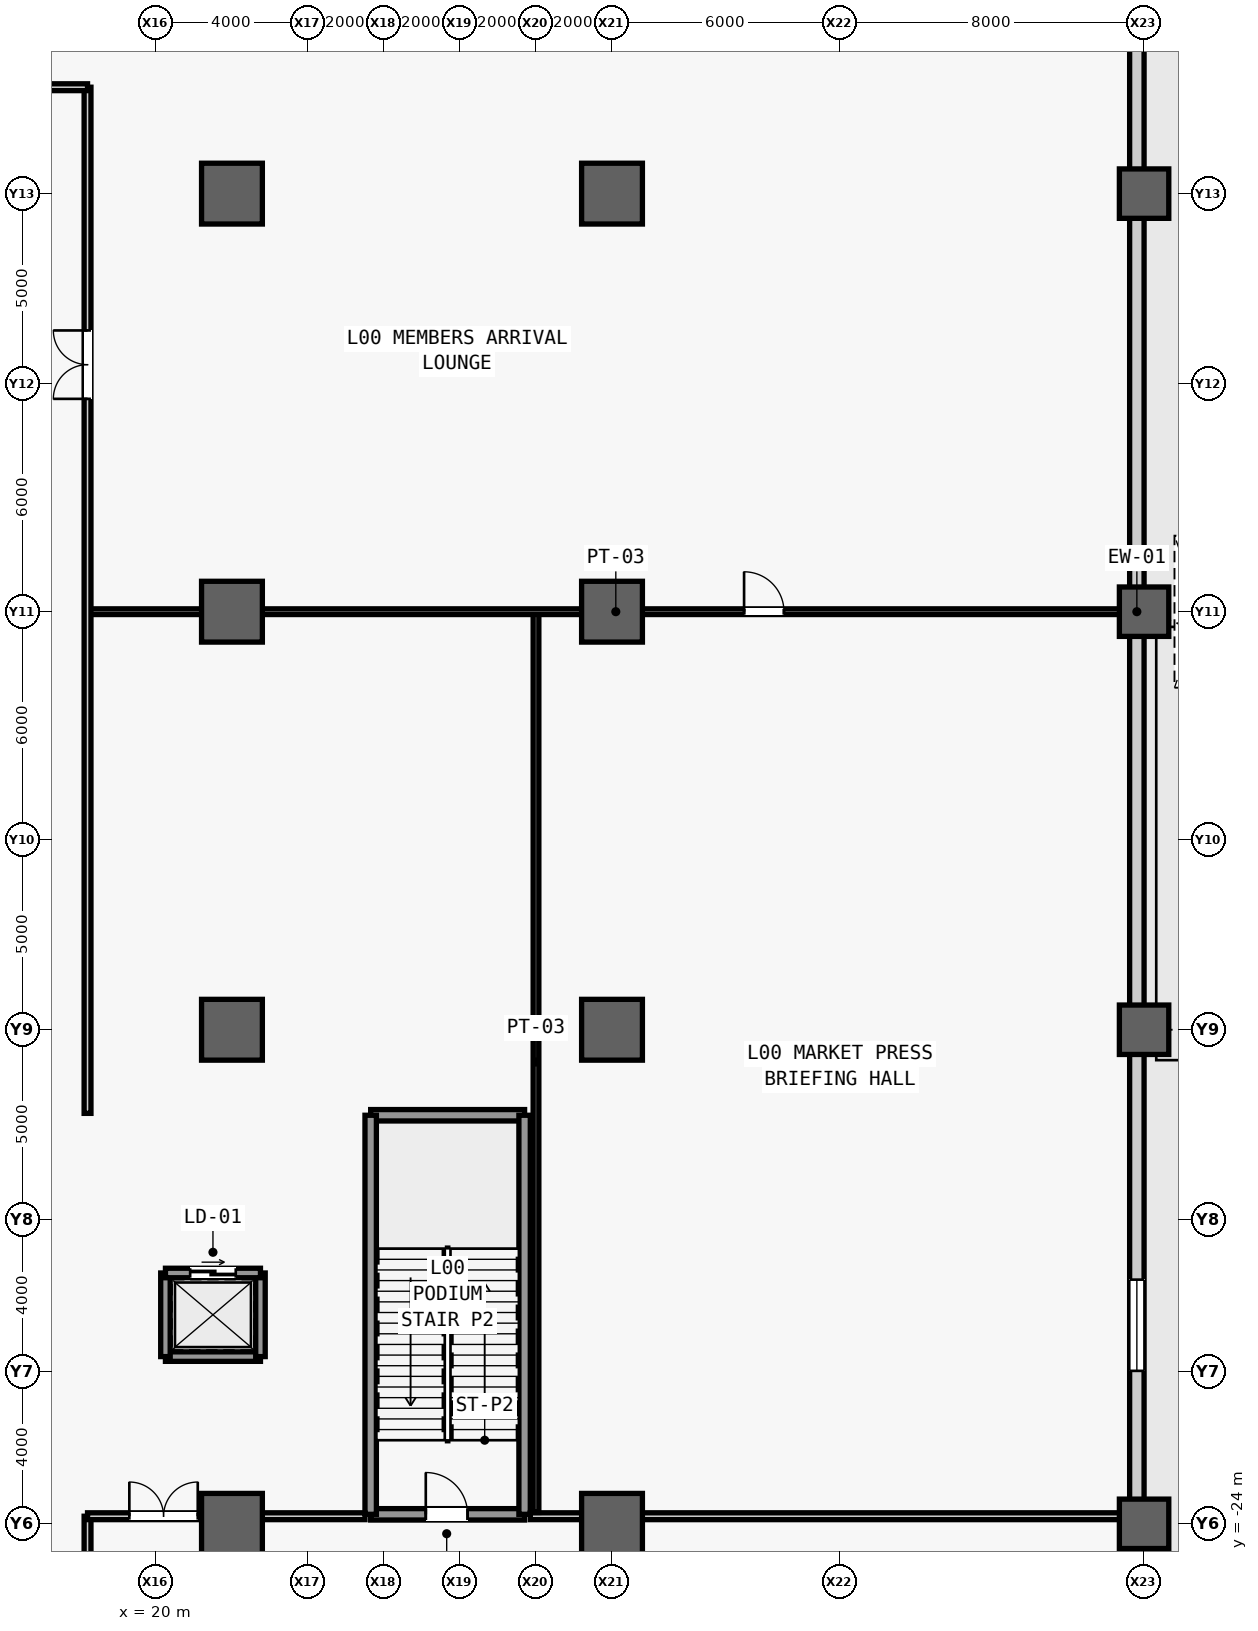
"""IFC4 building model, lengths in metres.
Left out: names, types, materials, properties, quantities, classifications, styles, units other than length and angle.
Written with IfcOpenShell. Run it as: python <this file> out.ifc"""

import sys

from ifc_helpers import new_model, si_unit, direction, frame, frame_2d, origin, origin_2d, place, context, subcontext, project, spatial, rectangle, extrude, source, transform, mapped, element, fill, save


model = new_model("IFC4")
c1 = context("Model", 3, precision=1e-05, world=origin(), true_north=direction((0.0, 1.0)))
c2 = subcontext(c1, "Body", "Model", "MODEL_VIEW")
j1 = project(units=[si_unit("LENGTHUNIT", "METRE"), si_unit("PLANEANGLEUNIT", "RADIAN")], contexts=[c1])
p1 = place(None, origin())
s1 = spatial("IfcSite", under=j1, at=p1, CompositionType="ELEMENT")
p2 = place(p1, origin())
s2 = spatial("IfcBuilding", under=s1, at=p2, CompositionType="ELEMENT")
p3 = place(p2, origin())
s3 = spatial("IfcBuildingStorey", under=s2, at=p3, CompositionType="ELEMENT", Elevation=0.0)
m1 = source(origin(), c2, "Body", "SweptSolid", [
    extrude(rectangle(XDim=1.6, YDim=1.6, at=origin_2d()), origin(), (0.0, 0.0, 1.0), 6.6),
])
for number, where, z_axis, x_axis in (
    (1, (22.0, -24.0, 0.0), (0.0, 0.0, 1.0), (1.0, 0.0, 0.0)),
    (2, (22.0, -11.0, 0.0), (0.0, 0.0, 1.0), (1.0, 0.0, 0.0)),
    (3, (22.0, 0.0, 0.0), (0.0, 0.0, 1.0), (1.0, 0.0, 0.0)),
    (4, (22.0, 11.0, 0.0), (0.0, 0.0, 1.0), (1.0, 0.0, 0.0)),
    (5, (32.0, -24.0, 0.0), (0.0, 0.0, 1.0), (1.0, 0.0, 0.0)),
    (6, (32.0, -11.0, 0.0), (0.0, 0.0, 1.0), (1.0, 0.0, 0.0)),
    (7, (32.0, 0.0, 0.0), (0.0, 0.0, 1.0), (1.0, 0.0, 0.0)),
    (8, (32.0, 11.0, 0.0), (0.0, 0.0, 1.0), (1.0, 0.0, 0.0)),
):
    element("IfcColumn", number, at=place(p3, frame(where, z_axis=z_axis, x_axis=x_axis)), inside=s3, PredefinedType="COLUMN", context=c2, shape_type="MappedRepresentation", body=[
        mapped(m1, transform((0.0, 0.0, 0.0), scale=1.0)),
    ])
m2 = source(origin(), c2, "Body", "SweptSolid", [
    extrude(rectangle(XDim=1.3, YDim=1.3, at=origin_2d()), origin(), (0.0, 0.0, 1.0), 6.6),
])
for number, where, z_axis, x_axis in (
    (9, (46.0, -24.0, 0.0), (0.0, 0.0, 1.0), (1.0, 0.0, 0.0)),
    (10, (46.0, -11.0, 0.0), (0.0, 0.0, 1.0), (1.0, 0.0, 0.0)),
    (11, (46.0, 0.0, 0.0), (0.0, 0.0, 1.0), (1.0, 0.0, 0.0)),
    (12, (46.0, 11.0, 0.0), (0.0, 0.0, 1.0), (1.0, 0.0, 0.0)),
):
    element("IfcColumn", number, at=place(p3, frame(where, z_axis=z_axis, x_axis=x_axis)), inside=s3, PredefinedType="COLUMN", context=c2, shape_type="MappedRepresentation", body=[
        mapped(m2, transform((0.0, 0.0, 0.0), scale=1.0)),
    ])
m3 = source(origin(), c2, "Body", "SweptSolid", [
    extrude(rectangle(XDim=75.1, YDim=0.38, at=frame_2d((37.55, 0.0))), origin(), (0.0, 0.0, 1.0), 4.48),
])
p4 = place(p3, frame((45.81, 37.55, 0.0), z_axis=(0.0, 0.0, 1.0), x_axis=(0.0, -1.0, 0.0)))
e13 = element("IfcWall", 13, at=p4, inside=s3, PredefinedType="STANDARD", context=c2, shape_type="MappedRepresentation", body=[
    mapped(m3, transform((0.0, 0.0, 0.0), scale=1.0)),
])
m4 = source(origin(), c2, "Body", "SweptSolid", [
    extrude(rectangle(XDim=2.0, YDim=2.3, at=frame_2d((1.0, 1.15))), frame((0.0, 0.2, 0.0), z_axis=(0.0, -1.0, 0.0), x_axis=(1.0, 0.0, 0.0)), (0.0, 0.0, 1.0), 0.4),
])
p5 = place(p4, frame((63.55, 0.0, 0.0)))
e14 = element("IfcOpeningElement", 14, at=p5, cuts=e13, PredefinedType="OPENING", context=c2, shape_type="MappedRepresentation", body=[
    mapped(m4, transform((0.0, 0.0, 0.0), scale=1.0)),
])
m5 = source(origin(), c2, "Body", "SweptSolid", [
    extrude(rectangle(XDim=6.2, YDim=3.6, at=frame_2d((3.1, 1.8))), frame((0.0, 0.2, 0.0), z_axis=(0.0, -1.0, 0.0), x_axis=(1.0, 0.0, 0.0)), (0.0, 0.0, 1.0), 0.4),
])
p6 = place(p4, frame((0.75, 0.0, 0.0)))
e15 = element("IfcOpeningElement", 15, at=p6, cuts=e13, PredefinedType="OPENING", context=c2, shape_type="MappedRepresentation", body=[
    mapped(m5, transform((0.0, 0.0, 0.0), scale=1.0)),
])
m6 = source(origin(), c2, "Body", "SweptSolid", [
    extrude(rectangle(XDim=2.4, YDim=2.6, at=frame_2d((1.2, 1.3))), frame((0.0, 0.2, 0.0), z_axis=(0.0, -1.0, 0.0), x_axis=(1.0, 0.0, 0.0)), (0.0, 0.0, 1.0), 0.4),
])
p7 = place(p4, frame((17.575, 0.0, 0.7)))
e16 = element("IfcOpeningElement", 16, at=p7, cuts=e13, PredefinedType="OPENING", context=c2, shape_type="MappedRepresentation", body=[
    mapped(m6, transform((0.0, 0.0, 0.0), scale=1.0)),
])
p8 = place(p4, frame((55.125, 0.0, 0.7)))
e17 = element("IfcOpeningElement", 17, at=p8, cuts=e13, PredefinedType="OPENING", context=c2, shape_type="MappedRepresentation", body=[
    mapped(m6, transform((0.0, 0.0, 0.0), scale=1.0)),
])
m7 = source(origin(), c2, "Body", "SweptSolid", [
    extrude(rectangle(XDim=4.05, YDim=0.3, at=frame_2d((2.025, 0.0))), origin(), (0.0, 0.0, 1.0), 6.28),
])
p9 = place(p3, frame((25.65, -23.75, 0.0), z_axis=(0.0, 0.0, 1.0), x_axis=(1.0, 0.0, 0.0)))
e18 = element("IfcWall", 18, at=p9, inside=s3, PredefinedType="SHEAR", context=c2, shape_type="MappedRepresentation", body=[
    mapped(m7, transform((0.0, 0.0, 0.0), scale=1.0)),
])
m8 = source(origin(), c2, "Body", "SweptSolid", [
    extrude(rectangle(XDim=1.1, YDim=2.2, at=frame_2d((0.55, 1.1))), frame((0.0, 0.16, 0.0), z_axis=(0.0, -1.0, 0.0), x_axis=(1.0, 0.0, 0.0)), (0.0, 0.0, 1.0), 0.32),
])
p10 = place(p9, frame((1.45, 0.0, 0.0)))
e19 = element("IfcOpeningElement", 19, at=p10, cuts=e18, PredefinedType="OPENING", context=c2, shape_type="MappedRepresentation", body=[
    mapped(m8, transform((0.0, 0.0, 0.0), scale=1.0)),
])
p11 = place(p3, frame((25.65, -13.25, 0.0), z_axis=(0.0, 0.0, 1.0), x_axis=(1.0, 0.0, 0.0)))
e20 = element("IfcWall", 20, at=p11, inside=s3, PredefinedType="SHEAR", context=c2, shape_type="MappedRepresentation", body=[
    mapped(m7, transform((0.0, 0.0, 0.0), scale=1.0)),
])
m9 = source(origin(), c2, "Body", "SweptSolid", [
    extrude(rectangle(XDim=10.5, YDim=0.3, at=frame_2d((5.25, 0.0))), origin(), (0.0, 0.0, 1.0), 6.28),
])
for number, where, z_axis, x_axis in (
    (21, (25.65, -23.75, 0.0), (0.0, 0.0, 1.0), (0.0, 1.0, 0.0)),
    (22, (29.7, -23.75, 0.0), (0.0, 0.0, 1.0), (0.0, 1.0, 0.0)),
):
    element("IfcWall", number, at=place(p3, frame(where, z_axis=z_axis, x_axis=x_axis)), inside=s3, PredefinedType="SHEAR", context=c2, shape_type="MappedRepresentation", body=[
        mapped(m9, transform((0.0, 0.0, 0.0), scale=1.0)),
    ])
m10 = source(origin(), c2, "Body", "SweptSolid", [
    extrude(rectangle(XDim=2.5, YDim=0.25, at=frame_2d((1.25, 0.0))), origin(), (0.0, 0.0, 1.0), 6.28),
])
p12 = place(p3, frame((20.25, -19.6, 0.0), z_axis=(0.0, 0.0, 1.0), x_axis=(1.0, 0.0, 0.0)))
e23 = element("IfcWall", 23, at=p12, inside=s3, PredefinedType="SHEAR", context=c2, shape_type="MappedRepresentation", body=[
    mapped(m10, transform((0.0, 0.0, 0.0), scale=1.0)),
])
m11 = source(origin(), c2, "Body", "SweptSolid", [
    extrude(rectangle(XDim=2.2, YDim=0.25, at=frame_2d((1.1, 0.0))), origin(), (0.0, 0.0, 1.0), 6.28),
])
for number, where, z_axis, x_axis in (
    (24, (20.25, -19.6, 0.0), (0.0, 0.0, 1.0), (0.0, 1.0, 0.0)),
    (25, (22.75, -19.6, 0.0), (0.0, 0.0, 1.0), (0.0, 1.0, 0.0)),
):
    element("IfcWall", number, at=place(p3, frame(where, z_axis=z_axis, x_axis=x_axis)), inside=s3, PredefinedType="SHEAR", context=c2, shape_type="MappedRepresentation", body=[
        mapped(m11, transform((0.0, 0.0, 0.0), scale=1.0)),
    ])
p13 = place(p3, frame((20.25, -17.4, 0.0), z_axis=(0.0, 0.0, 1.0), x_axis=(1.0, 0.0, 0.0)))
e26 = element("IfcWall", 26, at=p13, inside=s3, PredefinedType="SHEAR", context=c2, shape_type="MappedRepresentation", body=[
    mapped(m10, transform((0.0, 0.0, 0.0), scale=1.0)),
])
m12 = source(origin(), c2, "Body", "SweptSolid", [
    extrude(rectangle(XDim=1.2, YDim=2.3, at=frame_2d((0.6, 1.15))), frame((0.0, 0.135, 0.0), z_axis=(0.0, -1.0, 0.0), x_axis=(1.0, 0.0, 0.0)), (0.0, 0.0, 1.0), 0.27),
])
p14 = place(p13, frame((0.65, 0.0, 0.0)))
e27 = element("IfcOpeningElement", 27, at=p14, cuts=e26, PredefinedType="OPENING", context=c2, shape_type="MappedRepresentation", body=[
    mapped(m12, transform((0.0, 0.0, 0.0), scale=1.0)),
])
m13 = source(origin(), c2, "Body", "SweptSolid", [
    extrude(rectangle(XDim=4.5, YDim=0.18, at=frame_2d((2.25, 0.0))), origin(), (0.0, 0.0, 1.0), 6.28),
])
p15 = place(p3, frame((18.2, -28.3, 0.0), z_axis=(0.0, 0.0, 1.0), x_axis=(0.0, 1.0, 0.0)))
e28 = element("IfcWall", 28, at=p15, inside=s3, PredefinedType="PARTITIONING", context=c2, shape_type="MappedRepresentation", body=[
    mapped(m13, transform((0.0, 0.0, 0.0), scale=1.0)),
])
m14 = source(origin(), c2, "Body", "SweptSolid", [
    extrude(rectangle(XDim=1.8, YDim=2.25, at=frame_2d((0.9, 1.125))), frame((0.0, 0.1, 0.0), z_axis=(0.0, -1.0, 0.0), x_axis=(1.0, 0.0, 0.0)), (0.0, 0.0, 1.0), 0.2),
])
p16 = place(p15, frame((1.4, 0.0, 0.0)))
e29 = element("IfcOpeningElement", 29, at=p16, cuts=e28, PredefinedType="OPENING", context=c2, shape_type="MappedRepresentation", body=[
    mapped(m14, transform((0.0, 0.0, 0.0), scale=1.0)),
])
m15 = source(origin(), c2, "Body", "SweptSolid", [
    extrude(rectangle(XDim=7.3, YDim=0.18, at=frame_2d((3.65, 0.0))), origin(), (0.0, 0.0, 1.0), 4.08),
])
p17 = place(p3, frame((18.2, -23.8, 0.0), z_axis=(0.0, 0.0, 1.0), x_axis=(1.0, 0.0, 0.0)))
e30 = element("IfcWall", 30, at=p17, inside=s3, PredefinedType="PARTITIONING", context=c2, shape_type="MappedRepresentation", body=[
    mapped(m15, transform((0.0, 0.0, 0.0), scale=1.0)),
])
p18 = place(p17, frame((1.1, 0.0, 0.0)))
e31 = element("IfcOpeningElement", 31, at=p18, cuts=e30, PredefinedType="OPENING", context=c2, shape_type="MappedRepresentation", body=[
    mapped(m14, transform((0.0, 0.0, 0.0), scale=1.0)),
])
m16 = source(origin(), c2, "Body", "SweptSolid", [
    extrude(rectangle(XDim=16.15, YDim=0.18, at=frame_2d((8.075, 0.0))), origin(), (0.0, 0.0, 1.0), 4.48),
])
p19 = place(p3, frame((29.85, -23.8, 0.0), z_axis=(0.0, 0.0, 1.0), x_axis=(1.0, 0.0, 0.0)))
e32 = element("IfcWall", 32, at=p19, inside=s3, PredefinedType="PARTITIONING", context=c2, shape_type="MappedRepresentation", body=[
    mapped(m16, transform((0.0, 0.0, 0.0), scale=1.0)),
])
m17 = source(origin(), c2, "Body", "SweptSolid", [
    extrude(rectangle(XDim=23.7, YDim=0.15, at=frame_2d((11.85, 0.0))), origin(), (0.0, 0.0, 1.0), 6.28),
])
p20 = place(p3, frame((30.0, -23.7, 0.0), z_axis=(0.0, 0.0, 1.0), x_axis=(0.0, 1.0, 0.0)))
e33 = element("IfcWall", 33, at=p20, inside=s3, PredefinedType="PARTITIONING", context=c2, shape_type="MappedRepresentation", body=[
    mapped(m17, transform((0.0, 0.0, 0.0), scale=1.0)),
])
m18 = source(origin(), c2, "Body", "SweptSolid", [
    extrude(rectangle(XDim=27.8, YDim=0.15, at=frame_2d((13.9, 0.0))), origin(), (0.0, 0.0, 1.0), 4.48),
])
p21 = place(p3, frame((18.2, 0.0, 0.0), z_axis=(0.0, 0.0, 1.0), x_axis=(1.0, 0.0, 0.0)))
e34 = element("IfcWall", 34, at=p21, inside=s3, PredefinedType="PARTITIONING", context=c2, shape_type="MappedRepresentation", body=[
    mapped(m18, transform((0.0, 0.0, 0.0), scale=1.0)),
])
m19 = source(origin(), c2, "Body", "SweptSolid", [
    extrude(rectangle(XDim=1.05, YDim=2.2, at=frame_2d((0.525, 1.1))), frame((0.0, 0.085, 0.0), z_axis=(0.0, -1.0, 0.0), x_axis=(1.0, 0.0, 0.0)), (0.0, 0.0, 1.0), 0.17),
])
p22 = place(p21, frame((17.275, 0.0, 0.0)))
e35 = element("IfcOpeningElement", 35, at=p22, cuts=e34, PredefinedType="OPENING", context=c2, shape_type="MappedRepresentation", body=[
    mapped(m19, transform((0.0, 0.0, 0.0), scale=1.0)),
])
m20 = source(origin(), c2, "Body", "SweptSolid", [
    extrude(rectangle(XDim=27.0, YDim=0.18, at=frame_2d((13.5, 0.0))), origin(), (0.0, 0.0, 1.0), 6.28),
])
p23 = place(p3, frame((18.2, -13.2, 0.0), z_axis=(0.0, 0.0, 1.0), x_axis=(0.0, 1.0, 0.0)))
e36 = element("IfcWall", 36, at=p23, inside=s3, PredefinedType="PARTITIONING", context=c2, shape_type="MappedRepresentation", body=[
    mapped(m20, transform((0.0, 0.0, 0.0), scale=1.0)),
])
p24 = place(p23, frame((18.8, 0.0, 0.0)))
e37 = element("IfcOpeningElement", 37, at=p24, cuts=e36, PredefinedType="OPENING", context=c2, shape_type="MappedRepresentation", body=[
    mapped(m14, transform((0.0, 0.0, 0.0), scale=1.0)),
])
m21 = source(origin(), c2, "Body", "SweptSolid", [
    extrude(rectangle(XDim=36.4, YDim=0.18, at=frame_2d((18.2, 0.0))), origin(), (0.0, 0.0, 1.0), 6.28),
])
p25 = place(p3, frame((-18.2, 13.8, 0.0), z_axis=(0.0, 0.0, 1.0), x_axis=(1.0, 0.0, 0.0)))
e38 = element("IfcWall", 38, at=p25, inside=s3, PredefinedType="PARTITIONING", context=c2, shape_type="MappedRepresentation", body=[
    mapped(m21, transform((0.0, 0.0, 0.0), scale=1.0)),
])
p26 = place(p25, frame((17.3, 0.0, 0.0)))
e39 = element("IfcOpeningElement", 39, at=p26, cuts=e38, PredefinedType="OPENING", context=c2, shape_type="MappedRepresentation", body=[
    mapped(m14, transform((0.0, 0.0, 0.0), scale=1.0)),
])
m22 = source(origin(), c2, "Body", "SweptSolid", [
    extrude(rectangle(XDim=2.4, YDim=2.6, at=frame_2d((1.2, 1.3))), frame((0.0, 0.03, 0.0), z_axis=(0.0, -1.0, 0.0), x_axis=(1.0, 0.0, 0.0)), (0.0, 0.0, 1.0), 0.06),
])
p27 = place(p8, origin())
e40 = element("IfcWindow", 40, at=p27, inside=s3, PartitioningType="SINGLE_PANEL", PredefinedType="WINDOW", context=c2, shape_type="MappedRepresentation", body=[
    mapped(m22, transform((0.0, 0.0, 0.0), scale=1.0)),
])
fill(e17, e40)
m23 = source(origin(), c2, "Body", "SweptSolid", [
    extrude(rectangle(XDim=1.1, YDim=2.2, at=frame_2d((0.55, 1.1))), frame((0.0, 0.025, 0.0), z_axis=(0.0, -1.0, 0.0), x_axis=(1.0, 0.0, 0.0)), (0.0, 0.0, 1.0), 0.05),
])
p28 = place(p10, origin())
e41 = element("IfcDoor", 41, at=p28, inside=s3, OperationType="SINGLE_SWING_LEFT", PredefinedType="DOOR", context=c2, shape_type="MappedRepresentation", body=[
    mapped(m23, transform((0.0, 0.0, 0.0), scale=1.0)),
])
fill(e19, e41)
m24 = source(origin(), c2, "Body", "SweptSolid", [
    extrude(rectangle(XDim=1.8, YDim=2.25, at=frame_2d((0.9, 1.125))), frame((0.0, 0.025, 0.0), z_axis=(0.0, -1.0, 0.0), x_axis=(1.0, 0.0, 0.0)), (0.0, 0.0, 1.0), 0.05),
])
p29 = place(p18, origin())
e42 = element("IfcDoor", 42, at=p29, inside=s3, OperationType="SINGLE_SWING_RIGHT", PredefinedType="DOOR", context=c2, shape_type="MappedRepresentation", body=[
    mapped(m24, transform((0.0, 0.0, 0.0), scale=1.0)),
])
fill(e31, e42)
m25 = source(origin(), c2, "Body", "SweptSolid", [
    extrude(rectangle(XDim=1.05, YDim=2.2, at=frame_2d((0.525, 1.1))), frame((0.0, 0.025, 0.0), z_axis=(0.0, -1.0, 0.0), x_axis=(1.0, 0.0, 0.0)), (0.0, 0.0, 1.0), 0.05),
])
p30 = place(p22, origin())
e43 = element("IfcDoor", 43, at=p30, inside=s3, OperationType="SINGLE_SWING_LEFT", PredefinedType="DOOR", context=c2, shape_type="MappedRepresentation", body=[
    mapped(m25, transform((0.0, 0.0, 0.0), scale=1.0)),
])
fill(e35, e43)
p31 = place(p24, origin())
e44 = element("IfcDoor", 44, at=p31, inside=s3, OperationType="SINGLE_SWING_RIGHT", PredefinedType="DOOR", context=c2, shape_type="MappedRepresentation", body=[
    mapped(m24, transform((0.0, 0.0, 0.0), scale=1.0)),
])
fill(e37, e44)
m26 = source(origin(), c2, "Body", "SweptSolid", [
    extrude(rectangle(XDim=1.2, YDim=2.3, at=frame_2d((0.6, 1.15))), frame((0.0, 0.025, 0.0), z_axis=(0.0, -1.0, 0.0), x_axis=(1.0, 0.0, 0.0)), (0.0, 0.0, 1.0), 0.05),
])
p32 = place(p14, origin())
e45 = element("IfcDoor", 45, at=p32, inside=s3, OperationType="SLIDING_TO_LEFT", PredefinedType="DOOR", context=c2, shape_type="MappedRepresentation", body=[
    mapped(m26, transform((0.0, 0.0, 0.0), scale=1.0)),
])
fill(e27, e45)
save(model, sys.argv[1])
